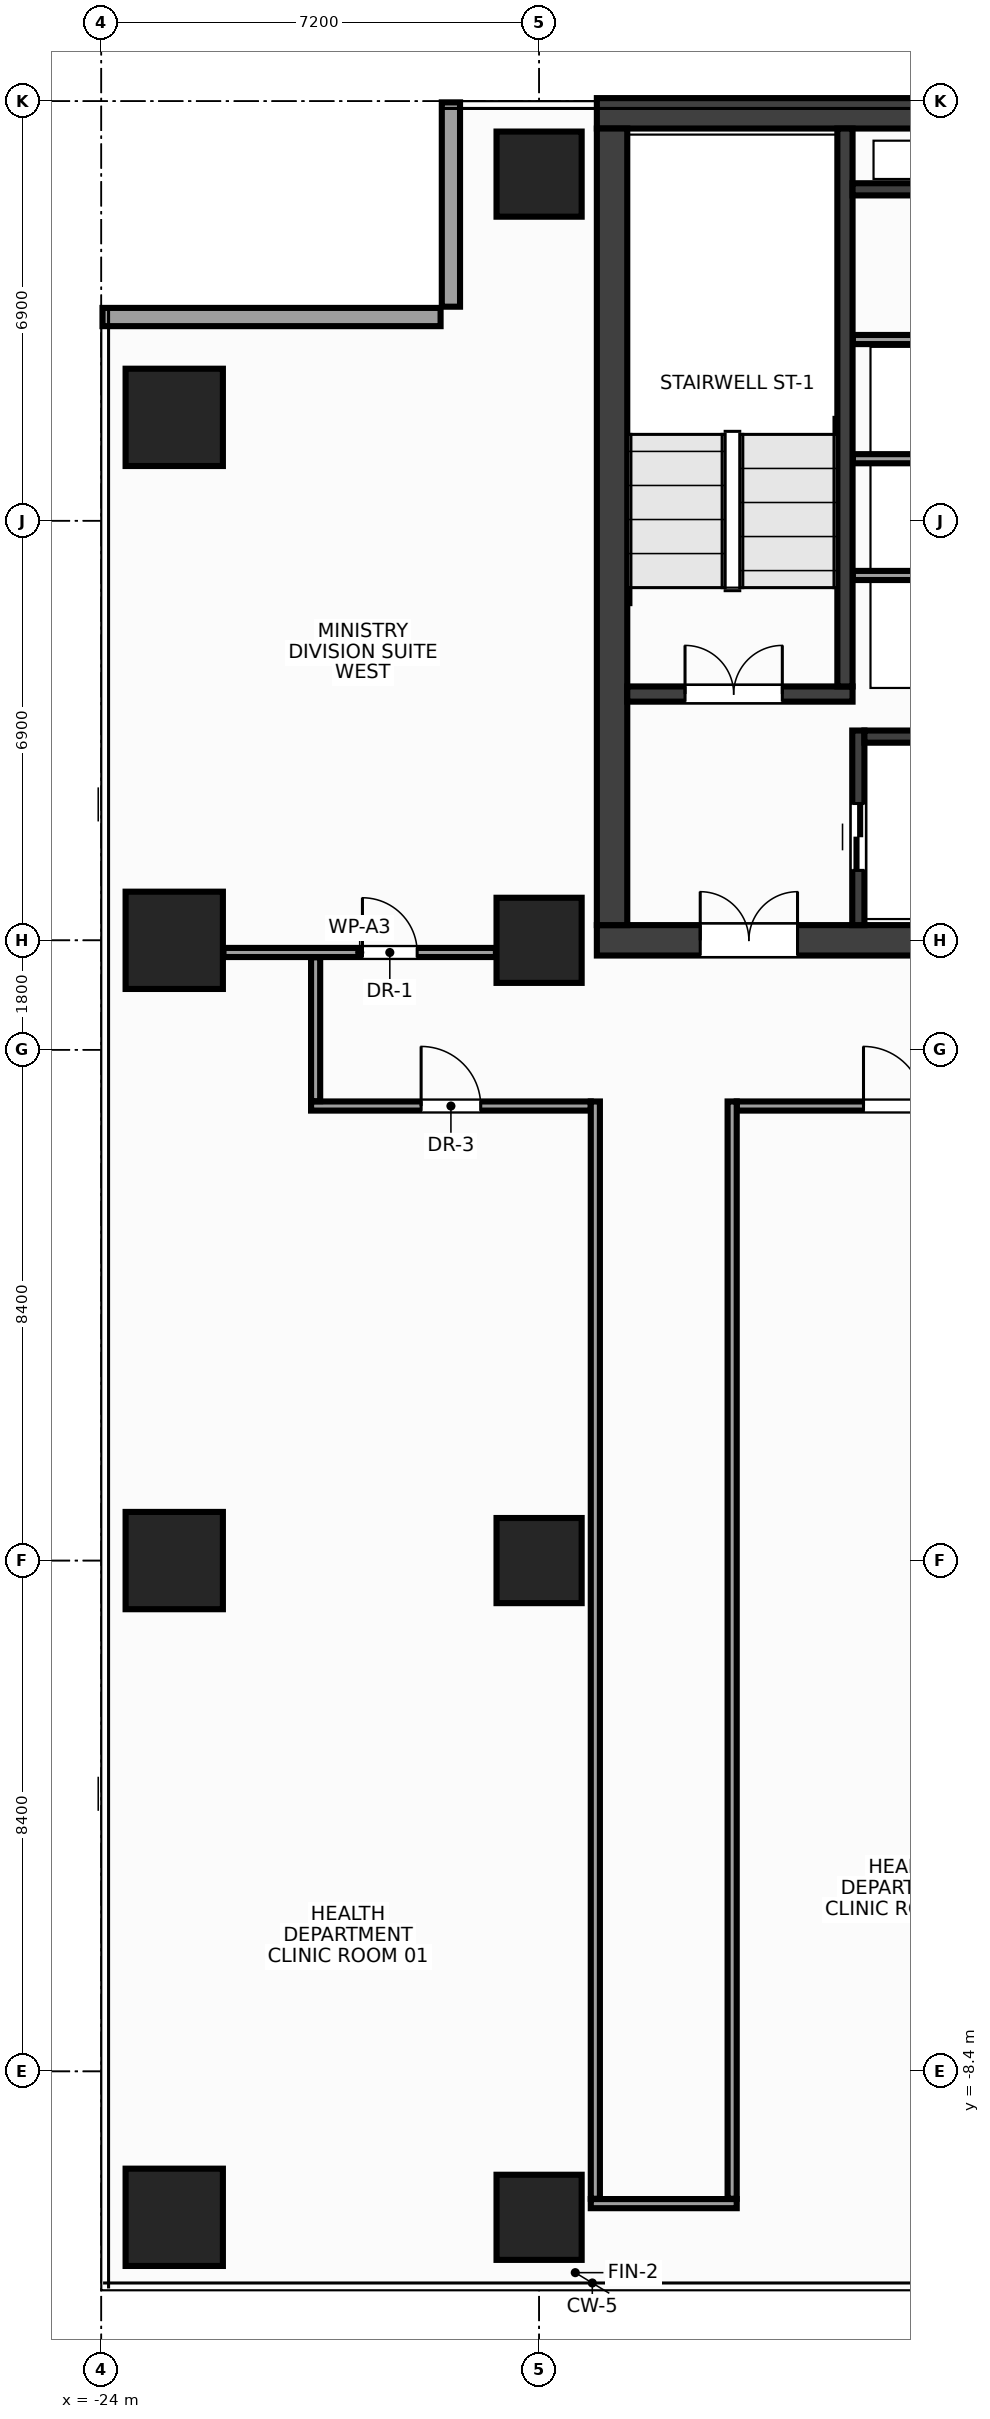
"""IFC4 building model, lengths in metres.
Left out: names, types, materials, properties, quantities, classifications, styles, units other than length and angle.
Written with IfcOpenShell. Run it as: python <this file> out.ifc"""

import sys

from ifc_helpers import new_model, si_unit, direction, frame, frame_2d, origin, origin_2d, place, context, subcontext, project, spatial, rectangle, extrude, source, transform, mapped, element, fill, save


model = new_model("IFC4")
c1 = context("Model", 3, precision=1e-05, world=origin(), true_north=direction((0.0, 1.0)))
c2 = subcontext(c1, "Body", "Model", "MODEL_VIEW")
j1 = project(units=[si_unit("LENGTHUNIT", "METRE"), si_unit("PLANEANGLEUNIT", "RADIAN")], contexts=[c1])
p1 = place(None, origin())
s1 = spatial("IfcSite", under=j1, at=p1, CompositionType="ELEMENT")
p2 = place(p1, origin())
s2 = spatial("IfcBuilding", under=s1, at=p2, CompositionType="ELEMENT")
p3 = place(p2, frame((0.0, 0.0, 207.2)))
s3 = spatial("IfcBuildingStorey", under=s2, at=p3, CompositionType="ELEMENT", Elevation=207.2)
m1 = source(origin(), c2, "Body", "SweptSolid", [
    extrude(rectangle(XDim=31.7, YDim=0.5, at=frame_2d((15.85, 0.0))), origin(), (0.0, 0.0, 1.0), 3.6),
])
p4 = place(p3, frame((-15.85, 23.8, 0.0), z_axis=(0.0, 0.0, 1.0), x_axis=(1.0, 0.0, 0.0)))
e1 = element("IfcWall", 1, at=p4, inside=s3, PredefinedType="SHEAR", context=c2, shape_type="MappedRepresentation", body=[
    mapped(m1, transform((0.0, 0.0, 0.0), x_axis=(1.0, 0.0, 0.0), y_axis=(0.0, 1.0, 0.0), z_axis=(0.0, 0.0, 1.0), scale=1.0)),
])
p5 = place(p3, frame((-15.85, 10.2, 0.0), z_axis=(0.0, 0.0, 1.0), x_axis=(1.0, 0.0, 0.0)))
e2 = element("IfcWall", 2, at=p5, inside=s3, PredefinedType="SHEAR", context=c2, shape_type="MappedRepresentation", body=[
    mapped(m1, transform((0.0, 0.0, 0.0), x_axis=(1.0, 0.0, 0.0), y_axis=(0.0, 1.0, 0.0), z_axis=(0.0, 0.0, 1.0), scale=1.0)),
])
p6 = place(p5, frame((1.7, 0.0, 0.0)))
e3 = element("IfcOpeningElement", 3, at=p6, cuts=e2, PredefinedType="OPENING", context=c2, shape_type="SweptSolid", body=[
    extrude(rectangle(XDim=1.6, YDim=2.15, at=frame_2d((0.8, 1.075))), frame((0.0, 0.262, 0.0), z_axis=(0.0, -1.0, 0.0), x_axis=(1.0, 0.0, 0.0)), (0.0, 0.0, 1.0), 0.524),
])
p7 = place(p5, frame((28.4, 0.0, 0.0)))
e4 = element("IfcOpeningElement", 4, at=p7, cuts=e2, PredefinedType="OPENING", context=c2, shape_type="SweptSolid", body=[
    extrude(rectangle(XDim=1.6, YDim=2.15, at=frame_2d((0.8, 1.075))), frame((0.0, 0.262, 0.0), z_axis=(0.0, -1.0, 0.0), x_axis=(1.0, 0.0, 0.0)), (0.0, 0.0, 1.0), 0.524),
])
p8 = place(p5, frame((15.1, 0.0, 0.0)))
e5 = element("IfcOpeningElement", 5, at=p8, cuts=e2, PredefinedType="OPENING", context=c2, shape_type="SweptSolid", body=[
    extrude(rectangle(XDim=1.5, YDim=2.2, at=frame_2d((0.75, 1.1))), frame((0.0, 0.262, 0.0), z_axis=(0.0, -1.0, 0.0), x_axis=(1.0, 0.0, 0.0)), (0.0, 0.0, 1.0), 0.524),
])
m2 = source(origin(), c2, "Body", "SweptSolid", [
    extrude(rectangle(XDim=13.1, YDim=0.5, at=frame_2d((6.55, 0.0))), origin(), (0.0, 0.0, 1.0), 3.6),
])
p9 = place(p3, frame((-15.6, 10.45, 0.0), z_axis=(0.0, 0.0, 1.0), x_axis=(0.0, 1.0, 0.0)))
e6 = element("IfcWall", 6, at=p9, inside=s3, PredefinedType="SHEAR", context=c2, shape_type="MappedRepresentation", body=[
    mapped(m2, transform((0.0, 0.0, 0.0), x_axis=(1.0, 0.0, 0.0), y_axis=(0.0, 1.0, 0.0), z_axis=(0.0, 0.0, 1.0), scale=1.0)),
])
m3 = source(origin(), c2, "Body", "SweptSolid", [
    extrude(rectangle(XDim=3.705, YDim=0.25, at=frame_2d((1.853, 0.0))), origin(), (0.0, 0.0, 1.0), 3.6),
])
p10 = place(p3, frame((-15.35, 14.25, 0.0), z_axis=(0.0, 0.0, 1.0), x_axis=(1.0, 0.0, 0.0)))
e7 = element("IfcWall", 7, at=p10, inside=s3, PredefinedType="SHEAR", context=c2, shape_type="MappedRepresentation", body=[
    mapped(m3, transform((0.0, 0.0, 0.0), x_axis=(1.0, 0.0, 0.0), y_axis=(0.0, 1.0, 0.0), z_axis=(0.0, 0.0, 1.0), scale=1.0)),
])
p11 = place(p10, frame((0.95, 0.0, 0.0)))
e8 = element("IfcOpeningElement", 8, at=p11, cuts=e7, PredefinedType="OPENING", context=c2, shape_type="SweptSolid", body=[
    extrude(rectangle(XDim=1.6, YDim=2.15, at=frame_2d((0.8, 1.075))), frame((0.0, 0.137, 0.0), z_axis=(0.0, -1.0, 0.0), x_axis=(1.0, 0.0, 0.0)), (0.0, 0.0, 1.0), 0.274),
])
m4 = source(origin(), c2, "Body", "SweptSolid", [
    extrude(rectangle(XDim=9.175, YDim=0.25, at=frame_2d((4.587, 0.0))), origin(), (0.0, 0.0, 1.0), 3.6),
])
p12 = place(p3, frame((-11.77, 14.375, 0.0), z_axis=(0.0, 0.0, 1.0), x_axis=(0.0, 1.0, 0.0)))
e9 = element("IfcWall", 9, at=p12, inside=s3, PredefinedType="SHEAR", context=c2, shape_type="MappedRepresentation", body=[
    mapped(m4, transform((0.0, 0.0, 0.0), x_axis=(1.0, 0.0, 0.0), y_axis=(0.0, 1.0, 0.0), z_axis=(0.0, 0.0, 1.0), scale=1.0)),
])
m5 = source(origin(), c2, "Body", "SweptSolid", [
    extrude(rectangle(XDim=3.2, YDim=0.2, at=frame_2d((1.6, 0.0))), origin(), (0.0, 0.0, 1.0), 3.6),
])
p13 = place(p3, frame((-11.55, 10.45, 0.0), z_axis=(0.0, 0.0, 1.0), x_axis=(0.0, 1.0, 0.0)))
e10 = element("IfcWall", 10, at=p13, inside=s3, PredefinedType="SHEAR", context=c2, shape_type="MappedRepresentation", body=[
    mapped(m5, transform((0.0, 0.0, 0.0), x_axis=(1.0, 0.0, 0.0), y_axis=(0.0, 1.0, 0.0), z_axis=(0.0, 0.0, 1.0), scale=1.0)),
])
p14 = place(p13, frame((0.9, 0.0, 0.0)))
e11 = element("IfcOpeningElement", 11, at=p14, cuts=e10, PredefinedType="OPENING", context=c2, shape_type="SweptSolid", body=[
    extrude(rectangle(XDim=1.1, YDim=2.15, at=frame_2d((0.55, 1.075))), frame((0.0, 0.112, 0.0), z_axis=(0.0, -1.0, 0.0), x_axis=(1.0, 0.0, 0.0)), (0.0, 0.0, 1.0), 0.224),
])
m6 = source(origin(), c2, "Body", "SweptSolid", [
    extrude(rectangle(XDim=2.825, YDim=0.2, at=frame_2d((1.413, 0.0))), origin(), (0.0, 0.0, 1.0), 3.6),
])
p15 = place(p3, frame((-11.45, 13.55, 0.0), z_axis=(0.0, 0.0, 1.0), x_axis=(1.0, 0.0, 0.0)))
e12 = element("IfcWall", 12, at=p15, inside=s3, PredefinedType="SHEAR", context=c2, shape_type="MappedRepresentation", body=[
    mapped(m6, transform((0.0, 0.0, 0.0), x_axis=(1.0, 0.0, 0.0), y_axis=(0.0, 1.0, 0.0), z_axis=(0.0, 0.0, 1.0), scale=1.0)),
])
m7 = source(origin(), c2, "Body", "SweptSolid", [
    extrude(rectangle(XDim=3.02, YDim=0.2, at=frame_2d((1.51, 0.0))), origin(), (0.0, 0.0, 1.0), 3.6),
])
p16 = place(p3, frame((-11.645, 22.55, 0.0), z_axis=(0.0, 0.0, 1.0), x_axis=(1.0, 0.0, 0.0)))
e13 = element("IfcWall", 13, at=p16, inside=s3, PredefinedType="SHEAR", context=c2, shape_type="MappedRepresentation", body=[
    mapped(m7, transform((0.0, 0.0, 0.0), x_axis=(1.0, 0.0, 0.0), y_axis=(0.0, 1.0, 0.0), z_axis=(0.0, 0.0, 1.0), scale=1.0)),
])
m8 = source(origin(), c2, "Body", "SweptSolid", [
    extrude(rectangle(XDim=1.4, YDim=1.4, at=origin_2d()), origin(), (0.0, 0.0, 1.0), 3.6),
])
for number, where, z_axis, x_axis in (
    (14, (-16.8, -10.8, 0.0), (0.0, 0.0, 1.0), (1.0, 0.0, 0.0)),
    (15, (-16.8, 0.0, 0.0), (0.0, 0.0, 1.0), (1.0, 0.0, 0.0)),
    (16, (-16.8, 10.2, 0.0), (0.0, 0.0, 1.0), (1.0, 0.0, 0.0)),
    (17, (-16.8, 22.8, 0.0), (0.0, 0.0, 1.0), (1.0, 0.0, 0.0)),
):
    element("IfcColumn", number, at=place(p3, frame(where, z_axis=z_axis, x_axis=x_axis)), inside=s3, PredefinedType="COLUMN", context=c2, shape_type="MappedRepresentation", body=[
        mapped(m8, transform((0.0, 0.0, 0.0), x_axis=(1.0, 0.0, 0.0), y_axis=(0.0, 1.0, 0.0), z_axis=(0.0, 0.0, 1.0), scale=1.0)),
    ])
m9 = source(origin(), c2, "Body", "SweptSolid", [
    extrude(rectangle(XDim=1.6, YDim=1.6, at=origin_2d()), origin(), (0.0, 0.0, 1.0), 3.6),
])
for number, where, z_axis, x_axis in (
    (18, (-22.8, -10.8, 0.0), (0.0, 0.0, 1.0), (1.0, 0.0, 0.0)),
    (19, (-22.8, 0.0, 0.0), (0.0, 0.0, 1.0), (1.0, 0.0, 0.0)),
    (20, (-22.8, 10.2, 0.0), (0.0, 0.0, 1.0), (1.0, 0.0, 0.0)),
    (21, (-22.8, 18.8, 0.0), (0.0, 0.0, 1.0), (1.0, 0.0, 0.0)),
):
    element("IfcColumn", number, at=place(p3, frame(where, z_axis=z_axis, x_axis=x_axis)), inside=s3, PredefinedType="COLUMN", context=c2, shape_type="MappedRepresentation", body=[
        mapped(m9, transform((0.0, 0.0, 0.0), x_axis=(1.0, 0.0, 0.0), y_axis=(0.0, 1.0, 0.0), z_axis=(0.0, 0.0, 1.0), scale=1.0)),
    ])
m10 = source(origin(), c2, "Body", "SweptSolid", [
    extrude(rectangle(XDim=3.36, YDim=0.3, at=frame_2d((1.68, 0.0))), origin(), (0.0, 0.0, 1.0), 2.76),
])
p17 = place(p3, frame((-18.25, 23.98, 0.0), z_axis=(0.0, 0.0, 1.0), x_axis=(0.0, -1.0, 0.0)))
e22 = element("IfcWall", 22, at=p17, inside=s3, PredefinedType="STANDARD", context=c2, shape_type="MappedRepresentation", body=[
    mapped(m10, transform((0.0, 0.0, 0.0), x_axis=(1.0, 0.0, 0.0), y_axis=(0.0, 1.0, 0.0), z_axis=(0.0, 0.0, 1.0), scale=1.0)),
])
m11 = source(origin(), c2, "Body", "SweptSolid", [
    extrude(rectangle(XDim=5.56, YDim=0.3, at=frame_2d((2.78, 0.0))), origin(), (0.0, 0.0, 1.0), 2.76),
])
p18 = place(p3, frame((-18.42, 20.45, 0.0), z_axis=(0.0, 0.0, 1.0), x_axis=(-1.0, 0.0, 0.0)))
e23 = element("IfcWall", 23, at=p18, inside=s3, PredefinedType="STANDARD", context=c2, shape_type="MappedRepresentation", body=[
    mapped(m11, transform((0.0, 0.0, 0.0), x_axis=(1.0, 0.0, 0.0), y_axis=(0.0, 1.0, 0.0), z_axis=(0.0, 0.0, 1.0), scale=1.0)),
])
m12 = source(origin(), c2, "Body", "SweptSolid", [
    extrude(rectangle(XDim=3.01, YDim=0.15, at=frame_2d((1.505, 0.0))), origin(), (0.0, 0.0, 1.0), 3.38),
])
for number, where, z_axis, x_axis in (
    (24, (-11.64, 16.2, 0.0), (0.0, 0.0, 1.0), (1.0, 0.0, 0.0)),
    (25, (-11.64, 18.12, 0.0), (0.0, 0.0, 1.0), (1.0, 0.0, 0.0)),
    (26, (-11.64, 20.08, 0.0), (0.0, 0.0, 1.0), (1.0, 0.0, 0.0)),
):
    element("IfcWall", number, at=place(p3, frame(where, z_axis=z_axis, x_axis=x_axis)), inside=s3, PredefinedType="PARTITIONING", context=c2, shape_type="MappedRepresentation", body=[
        mapped(m12, transform((0.0, 0.0, 0.0), x_axis=(1.0, 0.0, 0.0), y_axis=(0.0, 1.0, 0.0), z_axis=(0.0, 0.0, 1.0), scale=1.0)),
    ])
m13 = source(origin(), c2, "Body", "SweptSolid", [
    extrude(rectangle(XDim=4.48, YDim=0.15, at=frame_2d((2.24, 0.0))), origin(), (0.0, 0.0, 1.0), 2.915),
])
p19 = place(p3, frame((-21.99, 10.0, 0.0), z_axis=(0.0, 0.0, 1.0), x_axis=(1.0, 0.0, 0.0)))
e27 = element("IfcWall", 27, at=p19, inside=s3, PredefinedType="PARTITIONING", context=c2, shape_type="MappedRepresentation", body=[
    mapped(m13, transform((0.0, 0.0, 0.0), x_axis=(1.0, 0.0, 0.0), y_axis=(0.0, 1.0, 0.0), z_axis=(0.0, 0.0, 1.0), scale=1.0)),
])
p20 = place(p19, frame((2.285, 0.0, 0.0)))
e28 = element("IfcOpeningElement", 28, at=p20, cuts=e27, PredefinedType="OPENING", context=c2, shape_type="SweptSolid", body=[
    extrude(rectangle(XDim=0.9, YDim=2.15, at=frame_2d((0.45, 1.075))), frame((0.0, 0.087, 0.0), z_axis=(0.0, -1.0, 0.0), x_axis=(1.0, 0.0, 0.0)), (0.0, 0.0, 1.0), 0.174),
])
m14 = source(origin(), c2, "Body", "SweptSolid", [
    extrude(rectangle(XDim=4.6, YDim=0.15, at=frame_2d((2.3, 0.0))), origin(), (0.0, 0.0, 1.0), 2.765),
])
p21 = place(p3, frame((-20.55, 7.475, 0.0), z_axis=(0.0, 0.0, 1.0), x_axis=(1.0, 0.0, 0.0)))
e29 = element("IfcWall", 29, at=p21, inside=s3, PredefinedType="PARTITIONING", context=c2, shape_type="MappedRepresentation", body=[
    mapped(m14, transform((0.0, 0.0, 0.0), x_axis=(1.0, 0.0, 0.0), y_axis=(0.0, 1.0, 0.0), z_axis=(0.0, 0.0, 1.0), scale=1.0)),
])
p22 = place(p21, frame((1.81, 0.0, 0.0)))
e30 = element("IfcOpeningElement", 30, at=p22, cuts=e29, PredefinedType="OPENING", context=c2, shape_type="SweptSolid", body=[
    extrude(rectangle(XDim=0.98, YDim=2.15, at=frame_2d((0.49, 1.075))), frame((0.0, 0.087, 0.0), z_axis=(0.0, -1.0, 0.0), x_axis=(1.0, 0.0, 0.0)), (0.0, 0.0, 1.0), 0.174),
])
m15 = source(origin(), c2, "Body", "SweptSolid", [
    extrude(rectangle(XDim=5.15, YDim=0.15, at=frame_2d((2.575, 0.0))), origin(), (0.0, 0.0, 1.0), 3.38),
])
p23 = place(p3, frame((-13.55, 7.475, 0.0), z_axis=(0.0, 0.0, 1.0), x_axis=(1.0, 0.0, 0.0)))
e31 = element("IfcWall", 31, at=p23, inside=s3, PredefinedType="PARTITIONING", context=c2, shape_type="MappedRepresentation", body=[
    mapped(m15, transform((0.0, 0.0, 0.0), x_axis=(1.0, 0.0, 0.0), y_axis=(0.0, 1.0, 0.0), z_axis=(0.0, 0.0, 1.0), scale=1.0)),
])
p24 = place(p23, frame((2.085, 0.0, 0.0)))
e32 = element("IfcOpeningElement", 32, at=p24, cuts=e31, PredefinedType="OPENING", context=c2, shape_type="SweptSolid", body=[
    extrude(rectangle(XDim=0.98, YDim=2.15, at=frame_2d((0.49, 1.075))), frame((0.0, 0.087, 0.0), z_axis=(0.0, -1.0, 0.0), x_axis=(1.0, 0.0, 0.0)), (0.0, 0.0, 1.0), 0.174),
])
m16 = source(origin(), c2, "Body", "SweptSolid", [
    extrude(rectangle(XDim=2.4, YDim=0.15, at=frame_2d((1.2, 0.0))), origin(), (0.0, 0.0, 1.0), 2.915),
])
p25 = place(p3, frame((-15.95, -10.575, 0.0), z_axis=(0.0, 0.0, 1.0), x_axis=(1.0, 0.0, 0.0)))
e33 = element("IfcWall", 33, at=p25, inside=s3, PredefinedType="PARTITIONING", context=c2, shape_type="MappedRepresentation", body=[
    mapped(m16, transform((0.0, 0.0, 0.0), x_axis=(1.0, 0.0, 0.0), y_axis=(0.0, 1.0, 0.0), z_axis=(0.0, 0.0, 1.0), scale=1.0)),
])
m17 = source(origin(), c2, "Body", "SweptSolid", [
    extrude(rectangle(XDim=2.365, YDim=0.15, at=frame_2d((1.183, 0.0))), origin(), (0.0, 0.0, 1.0), 3.38),
])
p26 = place(p3, frame((-20.475, 7.555, 0.0), z_axis=(0.0, 0.0, 1.0), x_axis=(0.0, 1.0, 0.0)))
e34 = element("IfcWall", 34, at=p26, inside=s3, PredefinedType="PARTITIONING", context=c2, shape_type="MappedRepresentation", body=[
    mapped(m17, transform((0.0, 0.0, 0.0), x_axis=(1.0, 0.0, 0.0), y_axis=(0.0, 1.0, 0.0), z_axis=(0.0, 0.0, 1.0), scale=1.0)),
])
m18 = source(origin(), c2, "Body", "SweptSolid", [
    extrude(rectangle(XDim=18.045, YDim=0.15, at=frame_2d((9.022, 0.0))), origin(), (0.0, 0.0, 1.0), 2.915),
])
for number, where, z_axis, x_axis in (
    (35, (-15.875, -10.495, 0.0), (0.0, 0.0, 1.0), (0.0, 1.0, 0.0)),
    (36, (-13.625, -10.495, 0.0), (0.0, 0.0, 1.0), (0.0, 1.0, 0.0)),
):
    element("IfcWall", number, at=place(p3, frame(where, z_axis=z_axis, x_axis=x_axis)), inside=s3, PredefinedType="PARTITIONING", context=c2, shape_type="MappedRepresentation", body=[
        mapped(m18, transform((0.0, 0.0, 0.0), x_axis=(1.0, 0.0, 0.0), y_axis=(0.0, 1.0, 0.0), z_axis=(0.0, 0.0, 1.0), scale=1.0)),
    ])
m19 = source(origin(), c2, "Body", "SweptSolid", [
    extrude(rectangle(XDim=1.6, YDim=2.15, at=frame_2d((0.8, 1.075))), frame((0.0, 0.025, 0.0), z_axis=(0.0, -1.0, 0.0), x_axis=(1.0, 0.0, 0.0)), (0.0, 0.0, 1.0), 0.05),
])
p27 = place(p11, origin())
e37 = element("IfcDoor", 37, at=p27, inside=s3, OperationType="DOUBLE_DOOR_SINGLE_SWING", PredefinedType="DOOR", context=c2, shape_type="MappedRepresentation", body=[
    mapped(m19, transform((0.0, 0.0, 0.0), x_axis=(1.0, 0.0, 0.0), y_axis=(0.0, 1.0, 0.0), z_axis=(0.0, 0.0, 1.0), scale=1.0)),
])
fill(e8, e37)
p28 = place(p6, origin())
e38 = element("IfcDoor", 38, at=p28, inside=s3, OperationType="DOUBLE_DOOR_SINGLE_SWING", PredefinedType="DOOR", context=c2, shape_type="MappedRepresentation", body=[
    mapped(m19, transform((0.0, 0.0, 0.0), x_axis=(1.0, 0.0, 0.0), y_axis=(0.0, 1.0, 0.0), z_axis=(0.0, 0.0, 1.0), scale=1.0)),
])
fill(e3, e38)
m20 = source(origin(), c2, "Body", "SweptSolid", [
    extrude(rectangle(XDim=1.1, YDim=2.15, at=frame_2d((0.55, 1.075))), frame((0.0, 0.025, 0.0), z_axis=(0.0, -1.0, 0.0), x_axis=(1.0, 0.0, 0.0)), (0.0, 0.0, 1.0), 0.05),
])
p29 = place(p14, origin())
e39 = element("IfcDoor", 39, at=p29, inside=s3, OperationType="DOUBLE_DOOR_SLIDING", PredefinedType="DOOR", context=c2, shape_type="MappedRepresentation", body=[
    mapped(m20, transform((0.0, 0.0, 0.0), x_axis=(1.0, 0.0, 0.0), y_axis=(0.0, 1.0, 0.0), z_axis=(0.0, 0.0, 1.0), scale=1.0)),
])
fill(e11, e39)
m21 = source(origin(), c2, "Body", "SweptSolid", [
    extrude(rectangle(XDim=0.9, YDim=2.15, at=frame_2d((0.45, 1.075))), frame((0.0, 0.025, 0.0), z_axis=(0.0, -1.0, 0.0), x_axis=(1.0, 0.0, 0.0)), (0.0, 0.0, 1.0), 0.05),
])
p30 = place(p20, origin())
e40 = element("IfcDoor", 40, at=p30, inside=s3, OperationType="SINGLE_SWING_LEFT", PredefinedType="DOOR", context=c2, shape_type="MappedRepresentation", body=[
    mapped(m21, transform((0.0, 0.0, 0.0), x_axis=(1.0, 0.0, 0.0), y_axis=(0.0, 1.0, 0.0), z_axis=(0.0, 0.0, 1.0), scale=1.0)),
])
fill(e28, e40)
m22 = source(origin(), c2, "Body", "SweptSolid", [
    extrude(rectangle(XDim=0.98, YDim=2.15, at=frame_2d((0.49, 1.075))), frame((0.0, 0.025, 0.0), z_axis=(0.0, -1.0, 0.0), x_axis=(1.0, 0.0, 0.0)), (0.0, 0.0, 1.0), 0.05),
])
p31 = place(p22, origin())
e41 = element("IfcDoor", 41, at=p31, inside=s3, OperationType="SINGLE_SWING_LEFT", PredefinedType="DOOR", context=c2, shape_type="MappedRepresentation", body=[
    mapped(m22, transform((0.0, 0.0, 0.0), x_axis=(1.0, 0.0, 0.0), y_axis=(0.0, 1.0, 0.0), z_axis=(0.0, 0.0, 1.0), scale=1.0)),
])
fill(e30, e41)
p32 = place(p24, origin())
e42 = element("IfcDoor", 42, at=p32, inside=s3, OperationType="SINGLE_SWING_LEFT", PredefinedType="DOOR", context=c2, shape_type="MappedRepresentation", body=[
    mapped(m22, transform((0.0, 0.0, 0.0), x_axis=(1.0, 0.0, 0.0), y_axis=(0.0, 1.0, 0.0), z_axis=(0.0, 0.0, 1.0), scale=1.0)),
])
fill(e32, e42)
save(model, sys.argv[1])
